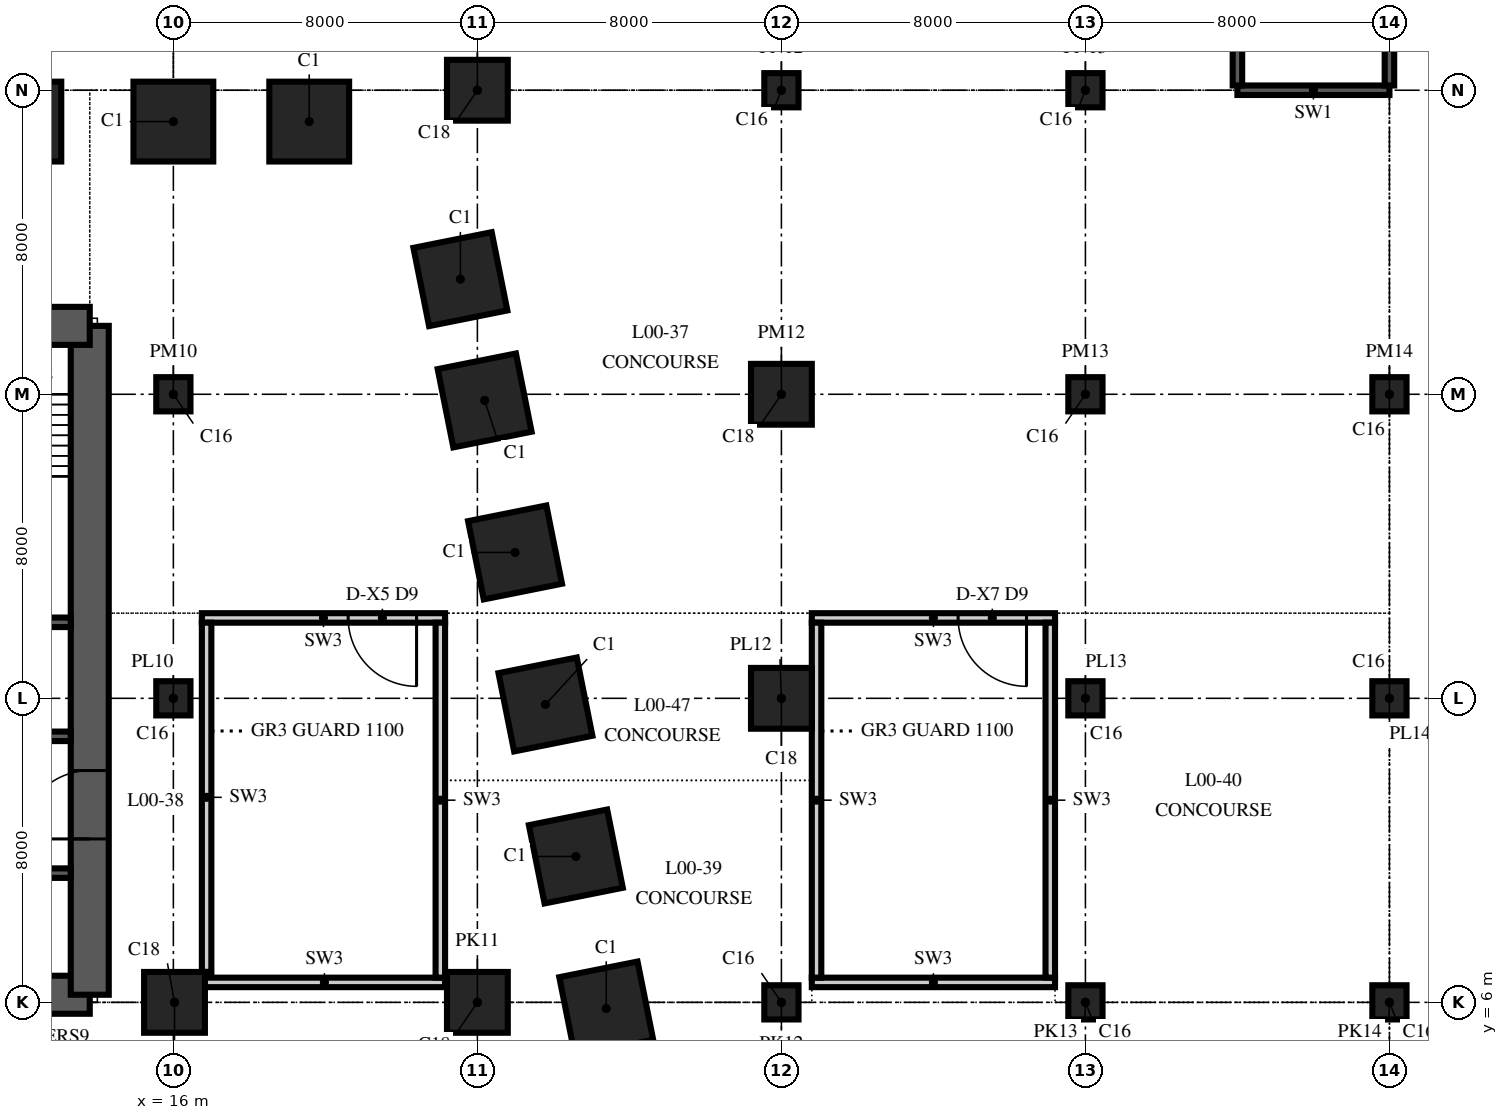
"""IFC4 building model, lengths in metres.
Left out: names, types, materials, properties, quantities, classifications, styles, units other than length and angle.
Written with IfcOpenShell. Run it as: python <this file> out.ifc"""

import sys

from ifc_helpers import new_model, si_unit, direction, frame, frame_2d, origin, origin_2d, place, context, subcontext, project, spatial, polyline, rectangle, outline, extrude, element, fill, save


model = new_model("IFC4")
c1 = context("Model", 3, precision=1e-05, world=origin(), true_north=direction((0.0, 1.0)))
c2 = subcontext(c1, "Body", "Model", "MODEL_VIEW")
j1 = project(units=[si_unit("LENGTHUNIT", "METRE"), si_unit("PLANEANGLEUNIT", "RADIAN")], contexts=[c1])
p1 = place(None, origin())
s1 = spatial("IfcSite", under=j1, at=p1, CompositionType="ELEMENT")
p2 = place(p1, origin())
s2 = spatial("IfcBuilding", under=s1, at=p2, CompositionType="ELEMENT")
p3 = place(p2, origin())
s3 = spatial("IfcBuildingStorey", under=s2, at=p3, CompositionType="ELEMENT", Elevation=0.0)
for number, where, z_axis, x_axis in (
    (1, (27.391, 5.838, 0.0), (0.0, 0.0, 1.0), (-0.196, 0.981, 0.0)),
    (2, (26.591, 9.838, 0.0), (0.0, 0.0, 1.0), (-0.196, 0.981, 0.0)),
    (3, (25.791, 13.838, 0.0), (0.0, 0.0, 1.0), (-0.196, 0.981, 0.0)),
    (4, (24.991, 17.838, 0.0), (0.0, 0.0, 1.0), (-0.196, 0.981, 0.0)),
    (5, (24.191, 21.838, 0.0), (0.0, 0.0, 1.0), (-0.196, 0.981, 0.0)),
    (6, (23.553, 25.029, 0.0), (0.0, 0.0, 1.0), (-0.196, 0.981, 0.0)),
    (7, (19.575, 29.175, 0.0), (0.0, 0.0, 1.0), (-1.0, 0.0, 0.0)),
    (8, (16.0, 29.175, 0.0), (0.0, 0.0, 1.0), (-1.0, 0.0, 0.0)),
    (9, (12.0, 29.175, 0.0), (0.0, 0.0, 1.0), (-1.0, 0.0, 0.0)),
):
    element("IfcColumn", number, at=place(p3, frame(where, z_axis=z_axis, x_axis=x_axis)), inside=s3, PredefinedType="COLUMN", context=c2, shape_type="SweptSolid", body=[
        extrude(rectangle(XDim=2.1, YDim=2.1, at=origin_2d()), origin(), (0.0, 0.0, 1.0), 6.0),
    ])
p4 = place(p3, frame((16.03, 6.0, 0.0), z_axis=(0.0, 0.0, 1.0), x_axis=(1.0, 0.0, 0.0)))
e10 = element("IfcColumn", 10, at=p4, inside=s3, PredefinedType="COLUMN", context=c2, shape_type="SweptSolid", body=[
    extrude(rectangle(XDim=1.6, YDim=1.6, at=origin_2d()), origin(), (0.0, 0.0, 1.0), 6.0),
])
for number, where, z_axis, x_axis in (
    (11, (16.0, 14.0, 0.0), (0.0, 0.0, 1.0), (1.0, 0.0, 0.0)),
    (12, (16.0, 22.0, 0.0), (0.0, 0.0, 1.0), (1.0, 0.0, 0.0)),
):
    element("IfcColumn", number, at=place(p3, frame(where, z_axis=z_axis, x_axis=x_axis)), inside=s3, PredefinedType="COLUMN", context=c2, shape_type="SweptSolid", body=[
        extrude(rectangle(XDim=0.9, YDim=0.9, at=origin_2d()), origin(), (0.0, 0.0, 1.0), 6.0),
    ])
for number, where, z_axis, x_axis in (
    (13, (24.0, 6.0, 0.0), (0.0, 0.0, 1.0), (1.0, 0.0, 0.0)),
    (14, (24.0, 30.0, 0.0), (0.0, 0.0, 1.0), (1.0, 0.0, 0.0)),
):
    element("IfcColumn", number, at=place(p3, frame(where, z_axis=z_axis, x_axis=x_axis)), inside=s3, PredefinedType="COLUMN", context=c2, shape_type="SweptSolid", body=[
        extrude(rectangle(XDim=1.6, YDim=1.6, at=origin_2d()), origin(), (0.0, 0.0, 1.0), 6.0),
    ])
p5 = place(p3, frame((32.0, 6.0, 0.0), z_axis=(0.0, 0.0, 1.0), x_axis=(1.0, 0.0, 0.0)))
e15 = element("IfcColumn", 15, at=p5, inside=s3, PredefinedType="COLUMN", context=c2, shape_type="SweptSolid", body=[
    extrude(rectangle(XDim=0.9, YDim=0.9, at=origin_2d()), origin(), (0.0, 0.0, 1.0), 6.0),
])
for number, where, z_axis, x_axis in (
    (16, (32.0, 14.0, 0.0), (0.0, 0.0, 1.0), (1.0, 0.0, 0.0)),
    (17, (32.0, 22.0, 0.0), (0.0, 0.0, 1.0), (1.0, 0.0, 0.0)),
):
    element("IfcColumn", number, at=place(p3, frame(where, z_axis=z_axis, x_axis=x_axis)), inside=s3, PredefinedType="COLUMN", context=c2, shape_type="SweptSolid", body=[
        extrude(rectangle(XDim=1.6, YDim=1.6, at=origin_2d()), origin(), (0.0, 0.0, 1.0), 6.0),
    ])
for number, where, z_axis, x_axis in (
    (18, (32.0, 30.0, 0.0), (0.0, 0.0, 1.0), (1.0, 0.0, 0.0)),
    (19, (40.0, 6.0, 0.0), (0.0, 0.0, 1.0), (1.0, 0.0, 0.0)),
    (20, (40.0, 14.0, 0.0), (0.0, 0.0, 1.0), (1.0, 0.0, 0.0)),
    (21, (40.0, 22.0, 0.0), (0.0, 0.0, 1.0), (1.0, 0.0, 0.0)),
    (22, (40.0, 30.0, 0.0), (0.0, 0.0, 1.0), (1.0, 0.0, 0.0)),
    (23, (48.0, 6.0, 0.0), (0.0, 0.0, 1.0), (1.0, 0.0, 0.0)),
    (24, (48.0, 14.0, 0.0), (0.0, 0.0, 1.0), (1.0, 0.0, 0.0)),
    (25, (48.0, 22.0, 0.0), (0.0, 0.0, 1.0), (1.0, 0.0, 0.0)),
):
    element("IfcColumn", number, at=place(p3, frame(where, z_axis=z_axis, x_axis=x_axis)), inside=s3, PredefinedType="COLUMN", context=c2, shape_type="SweptSolid", body=[
        extrude(rectangle(XDim=0.9, YDim=0.9, at=origin_2d()), origin(), (0.0, 0.0, 1.0), 6.0),
    ])
p6 = place(p3, frame((-13.8, 6.2, 0.0), z_axis=(0.0, 0.0, 1.0), x_axis=(1.0, 0.0, 0.0)))
e26 = element("IfcWall", 26, at=p6, inside=s3, PredefinedType="SHEAR", context=c2, shape_type="SweptSolid", body=[
    extrude(rectangle(XDim=27.6, YDim=1.0, at=frame_2d((13.8, 0.0))), origin(), (0.0, 0.0, 1.0), 6.0),
])
p7 = place(p3, frame((13.8, 6.2, 0.0), z_axis=(0.0, 0.0, 1.0), x_axis=(0.0, 1.0, 0.0)))
e27 = element("IfcWall", 27, at=p7, inside=s3, PredefinedType="SHEAR", context=c2, shape_type="SweptSolid", body=[
    extrude(outline(polyline([(0.0, -0.5), (17.6, -0.5), (17.6, 0.0), (17.1, 0.0), (17.1, 0.5), (0.5, 0.5), (0.5, 0.0), (0.0, 0.0), (0.0, -0.5)])), origin(), (0.0, 0.0, 1.0), 6.0),
])
p8 = place(p7, frame((4.1, 0.0, 0.0)))
e28 = element("IfcOpeningElement", 28, at=p8, cuts=e27, PredefinedType="OPENING", context=c2, shape_type="SweptSolid", body=[
    extrude(rectangle(XDim=1.8, YDim=2.4, at=frame_2d((0.9, 1.2))), frame((0.0, 0.515, 0.0), z_axis=(0.0, -1.0, 0.0), x_axis=(1.0, 0.0, 0.0)), (0.0, 0.0, 1.0), 1.03),
])
p9 = place(p3, frame((13.8, 23.8, 0.0), z_axis=(0.0, 0.0, 1.0), x_axis=(-1.0, 0.0, 0.0)))
e29 = element("IfcWall", 29, at=p9, inside=s3, PredefinedType="SHEAR", context=c2, shape_type="SweptSolid", body=[
    extrude(rectangle(XDim=27.6, YDim=1.0, at=frame_2d((13.8, 0.0))), origin(), (0.0, 0.0, 1.0), 6.0),
])
p10 = place(p9, frame((21.7, 0.0, 0.0)))
e30 = element("IfcOpeningElement", 30, at=p10, cuts=e29, PredefinedType="OPENING", context=c2, shape_type="SweptSolid", body=[
    extrude(rectangle(XDim=1.0, YDim=2.1, at=frame_2d((0.5, 1.05))), frame((0.0, 0.515, 0.0), z_axis=(0.0, -1.0, 0.0), x_axis=(1.0, 0.0, 0.0)), (0.0, 0.0, 1.0), 1.03),
])
p11 = place(p9, frame((4.9, 0.0, 0.0)))
e31 = element("IfcOpeningElement", 31, at=p11, cuts=e29, PredefinedType="OPENING", context=c2, shape_type="SweptSolid", body=[
    extrude(rectangle(XDim=1.0, YDim=2.1, at=frame_2d((0.5, 1.05))), frame((0.0, 0.515, 0.0), z_axis=(0.0, -1.0, 0.0), x_axis=(1.0, 0.0, 0.0)), (0.0, 0.0, 1.0), 1.03),
])
p12 = place(p9, frame((17.3, 0.0, 0.0)))
e32 = element("IfcOpeningElement", 32, at=p12, cuts=e29, PredefinedType="OPENING", context=c2, shape_type="SweptSolid", body=[
    extrude(rectangle(XDim=1.0, YDim=2.1, at=frame_2d((0.5, 1.05))), frame((0.0, 0.515, 0.0), z_axis=(0.0, -1.0, 0.0), x_axis=(1.0, 0.0, 0.0)), (0.0, 0.0, 1.0), 1.03),
])
p13 = place(p9, frame((13.3, 0.0, 0.0)))
e33 = element("IfcOpeningElement", 33, at=p13, cuts=e29, PredefinedType="OPENING", context=c2, shape_type="SweptSolid", body=[
    extrude(rectangle(XDim=1.0, YDim=2.1, at=frame_2d((0.5, 1.05))), frame((0.0, 0.515, 0.0), z_axis=(0.0, -1.0, 0.0), x_axis=(1.0, 0.0, 0.0)), (0.0, 0.0, 1.0), 1.03),
])
p14 = place(p9, frame((9.3, 0.0, 0.0)))
e34 = element("IfcOpeningElement", 34, at=p14, cuts=e29, PredefinedType="OPENING", context=c2, shape_type="SweptSolid", body=[
    extrude(rectangle(XDim=1.0, YDim=2.1, at=frame_2d((0.5, 1.05))), frame((0.0, 0.515, 0.0), z_axis=(0.0, -1.0, 0.0), x_axis=(1.0, 0.0, 0.0)), (0.0, 0.0, 1.0), 1.03),
])
p15 = place(p3, frame((-13.3, 9.4, 0.0), z_axis=(0.0, 0.0, 1.0), x_axis=(1.0, 0.0, 0.0)))
e35 = element("IfcWall", 35, at=p15, inside=s3, PredefinedType="SHEAR", context=c2, shape_type="SweptSolid", body=[
    extrude(rectangle(XDim=26.6, YDim=0.25, at=frame_2d((13.3, 0.0))), origin(), (0.0, 0.0, 1.0), 6.0),
])
p16 = place(p15, frame((0.15, 0.0, 0.0)))
e36 = element("IfcOpeningElement", 36, at=p16, cuts=e35, PredefinedType="OPENING", context=c2, shape_type="SweptSolid", body=[
    extrude(rectangle(XDim=1.1, YDim=2.1, at=frame_2d((0.55, 1.05))), frame((0.0, 0.14, 0.0), z_axis=(0.0, -1.0, 0.0), x_axis=(1.0, 0.0, 0.0)), (0.0, 0.0, 1.0), 0.28),
])
p17 = place(p15, frame((2.95, 0.0, 0.0)))
e37 = element("IfcOpeningElement", 37, at=p17, cuts=e35, PredefinedType="OPENING", context=c2, shape_type="SweptSolid", body=[
    extrude(rectangle(XDim=1.1, YDim=2.1, at=frame_2d((0.55, 1.05))), frame((0.0, 0.14, 0.0), z_axis=(0.0, -1.0, 0.0), x_axis=(1.0, 0.0, 0.0)), (0.0, 0.0, 1.0), 0.28),
])
p18 = place(p15, frame((5.75, 0.0, 0.0)))
e38 = element("IfcOpeningElement", 38, at=p18, cuts=e35, PredefinedType="OPENING", context=c2, shape_type="SweptSolid", body=[
    extrude(rectangle(XDim=1.1, YDim=2.1, at=frame_2d((0.55, 1.05))), frame((0.0, 0.14, 0.0), z_axis=(0.0, -1.0, 0.0), x_axis=(1.0, 0.0, 0.0)), (0.0, 0.0, 1.0), 0.28),
])
p19 = place(p15, frame((8.55, 0.0, 0.0)))
e39 = element("IfcOpeningElement", 39, at=p19, cuts=e35, PredefinedType="OPENING", context=c2, shape_type="SweptSolid", body=[
    extrude(rectangle(XDim=1.1, YDim=2.1, at=frame_2d((0.55, 1.05))), frame((0.0, 0.14, 0.0), z_axis=(0.0, -1.0, 0.0), x_axis=(1.0, 0.0, 0.0)), (0.0, 0.0, 1.0), 0.28),
])
p20 = place(p15, frame((11.35, 0.0, 0.0)))
e40 = element("IfcOpeningElement", 40, at=p20, cuts=e35, PredefinedType="OPENING", context=c2, shape_type="SweptSolid", body=[
    extrude(rectangle(XDim=1.1, YDim=2.1, at=frame_2d((0.55, 1.05))), frame((0.0, 0.14, 0.0), z_axis=(0.0, -1.0, 0.0), x_axis=(1.0, 0.0, 0.0)), (0.0, 0.0, 1.0), 0.28),
])
p21 = place(p15, frame((14.15, 0.0, 0.0)))
e41 = element("IfcOpeningElement", 41, at=p21, cuts=e35, PredefinedType="OPENING", context=c2, shape_type="SweptSolid", body=[
    extrude(rectangle(XDim=1.1, YDim=2.1, at=frame_2d((0.55, 1.05))), frame((0.0, 0.14, 0.0), z_axis=(0.0, -1.0, 0.0), x_axis=(1.0, 0.0, 0.0)), (0.0, 0.0, 1.0), 0.28),
])
p22 = place(p15, frame((16.95, 0.0, 0.0)))
e42 = element("IfcOpeningElement", 42, at=p22, cuts=e35, PredefinedType="OPENING", context=c2, shape_type="SweptSolid", body=[
    extrude(rectangle(XDim=1.1, YDim=2.1, at=frame_2d((0.55, 1.05))), frame((0.0, 0.14, 0.0), z_axis=(0.0, -1.0, 0.0), x_axis=(1.0, 0.0, 0.0)), (0.0, 0.0, 1.0), 0.28),
])
p23 = place(p15, frame((19.75, 0.0, 0.0)))
e43 = element("IfcOpeningElement", 43, at=p23, cuts=e35, PredefinedType="OPENING", context=c2, shape_type="SweptSolid", body=[
    extrude(rectangle(XDim=1.1, YDim=2.1, at=frame_2d((0.55, 1.05))), frame((0.0, 0.14, 0.0), z_axis=(0.0, -1.0, 0.0), x_axis=(1.0, 0.0, 0.0)), (0.0, 0.0, 1.0), 0.28),
])
p24 = place(p15, frame((22.55, 0.0, 0.0)))
e44 = element("IfcOpeningElement", 44, at=p24, cuts=e35, PredefinedType="OPENING", context=c2, shape_type="SweptSolid", body=[
    extrude(rectangle(XDim=1.1, YDim=2.1, at=frame_2d((0.55, 1.05))), frame((0.0, 0.14, 0.0), z_axis=(0.0, -1.0, 0.0), x_axis=(1.0, 0.0, 0.0)), (0.0, 0.0, 1.0), 0.28),
])
p25 = place(p3, frame((-13.3, 13.0, 0.0), z_axis=(0.0, 0.0, 1.0), x_axis=(1.0, 0.0, 0.0)))
e45 = element("IfcWall", 45, at=p25, inside=s3, PredefinedType="SHEAR", context=c2, shape_type="SweptSolid", body=[
    extrude(rectangle(XDim=26.6, YDim=0.25, at=frame_2d((13.3, 0.0))), origin(), (0.0, 0.0, 1.0), 6.0),
])
p26 = place(p25, frame((0.15, 0.0, 0.0)))
e46 = element("IfcOpeningElement", 46, at=p26, cuts=e45, PredefinedType="OPENING", context=c2, shape_type="SweptSolid", body=[
    extrude(rectangle(XDim=1.1, YDim=2.1, at=frame_2d((0.55, 1.05))), frame((0.0, 0.14, 0.0), z_axis=(0.0, -1.0, 0.0), x_axis=(1.0, 0.0, 0.0)), (0.0, 0.0, 1.0), 0.28),
])
p27 = place(p25, frame((8.55, 0.0, 0.0)))
e47 = element("IfcOpeningElement", 47, at=p27, cuts=e45, PredefinedType="OPENING", context=c2, shape_type="SweptSolid", body=[
    extrude(rectangle(XDim=1.1, YDim=2.1, at=frame_2d((0.55, 1.05))), frame((0.0, 0.14, 0.0), z_axis=(0.0, -1.0, 0.0), x_axis=(1.0, 0.0, 0.0)), (0.0, 0.0, 1.0), 0.28),
])
p28 = place(p25, frame((11.95, 0.0, 0.0)))
e48 = element("IfcOpeningElement", 48, at=p28, cuts=e45, PredefinedType="OPENING", context=c2, shape_type="SweptSolid", body=[
    extrude(rectangle(XDim=1.1, YDim=2.1, at=frame_2d((0.55, 1.05))), frame((0.0, 0.14, 0.0), z_axis=(0.0, -1.0, 0.0), x_axis=(1.0, 0.0, 0.0)), (0.0, 0.0, 1.0), 0.28),
])
p29 = place(p25, frame((15.05, 0.0, 0.0)))
e49 = element("IfcOpeningElement", 49, at=p29, cuts=e45, PredefinedType="OPENING", context=c2, shape_type="SweptSolid", body=[
    extrude(rectangle(XDim=0.9, YDim=2.1, at=frame_2d((0.45, 1.05))), frame((0.0, 0.14, 0.0), z_axis=(0.0, -1.0, 0.0), x_axis=(1.0, 0.0, 0.0)), (0.0, 0.0, 1.0), 0.28),
])
p30 = place(p25, frame((17.45, 0.0, 0.0)))
e50 = element("IfcOpeningElement", 50, at=p30, cuts=e45, PredefinedType="OPENING", context=c2, shape_type="SweptSolid", body=[
    extrude(rectangle(XDim=0.9, YDim=2.1, at=frame_2d((0.45, 1.05))), frame((0.0, 0.14, 0.0), z_axis=(0.0, -1.0, 0.0), x_axis=(1.0, 0.0, 0.0)), (0.0, 0.0, 1.0), 0.28),
])
p31 = place(p25, frame((20.85, 0.0, 0.0)))
e51 = element("IfcOpeningElement", 51, at=p31, cuts=e45, PredefinedType="OPENING", context=c2, shape_type="SweptSolid", body=[
    extrude(rectangle(XDim=0.9, YDim=2.1, at=frame_2d((0.45, 1.05))), frame((0.0, 0.14, 0.0), z_axis=(0.0, -1.0, 0.0), x_axis=(1.0, 0.0, 0.0)), (0.0, 0.0, 1.0), 0.28),
])
p32 = place(p3, frame((-13.3, 16.0, 0.0), z_axis=(0.0, 0.0, 1.0), x_axis=(1.0, 0.0, 0.0)))
e52 = element("IfcWall", 52, at=p32, inside=s3, PredefinedType="SHEAR", context=c2, shape_type="SweptSolid", body=[
    extrude(rectangle(XDim=26.6, YDim=0.25, at=frame_2d((13.3, 0.0))), origin(), (0.0, 0.0, 1.0), 6.0),
])
p33 = place(p3, frame((44.0, 30.0, 0.0), z_axis=(0.0, 0.0, 1.0), x_axis=(1.0, 0.0, 0.0)))
e53 = element("IfcWall", 53, at=p33, inside=s3, PredefinedType="SOLIDWALL", context=c2, shape_type="SweptSolid", body=[
    extrude(rectangle(XDim=4.0, YDim=0.25, at=frame_2d((2.0, 0.0))), origin(), (0.0, 0.0, 1.0), 6.0),
])
p34 = place(p3, frame((48.0, 30.125, 0.0), z_axis=(0.0, 0.0, 1.0), x_axis=(0.0, 1.0, 0.0)))
e54 = element("IfcWall", 54, at=p34, inside=s3, PredefinedType="SOLIDWALL", context=c2, shape_type="SweptSolid", body=[
    extrude(rectangle(XDim=7.75, YDim=0.25, at=frame_2d((3.875, 0.0))), origin(), (0.0, 0.0, 1.0), 6.0),
])
p35 = place(p34, frame((5.85, 0.0, 0.0)))
e55 = element("IfcOpeningElement", 55, at=p35, cuts=e54, PredefinedType="OPENING", context=c2, shape_type="SweptSolid", body=[
    extrude(rectangle(XDim=1.6, YDim=2.1, at=frame_2d((0.8, 1.05))), frame((0.0, 0.14, 0.0), z_axis=(0.0, -1.0, 0.0), x_axis=(1.0, 0.0, 0.0)), (0.0, 0.0, 1.0), 0.28),
])
p36 = place(p3, frame((44.0, 37.875, 0.0), z_axis=(0.0, 0.0, 1.0), x_axis=(0.0, -1.0, 0.0)))
e56 = element("IfcWall", 56, at=p36, inside=s3, PredefinedType="SOLIDWALL", context=c2, shape_type="SweptSolid", body=[
    extrude(rectangle(XDim=7.75, YDim=0.25, at=frame_2d((3.875, 0.0))), origin(), (0.0, 0.0, 1.0), 6.0),
])
p37 = place(p3, frame((16.8, 6.525, 0.0), z_axis=(0.0, 0.0, 1.0), x_axis=(1.0, 0.0, 0.0)))
e57 = element("IfcWall", 57, at=p37, inside=s3, PredefinedType="SOLIDWALL", context=c2, shape_type="SweptSolid", body=[
    extrude(rectangle(XDim=6.35, YDim=0.25, at=frame_2d((3.175, 0.0))), origin(), (0.0, 0.0, 1.0), 5.05),
])
p38 = place(p3, frame((23.15, 16.115, 0.0), z_axis=(0.0, 0.0, 1.0), x_axis=(-1.0, 0.0, 0.0)))
e58 = element("IfcWall", 58, at=p38, inside=s3, PredefinedType="SOLIDWALL", context=c2, shape_type="SweptSolid", body=[
    extrude(rectangle(XDim=6.4, YDim=0.25, at=frame_2d((3.2, 0.0))), origin(), (0.0, 0.0, 1.0), 6.0),
])
p39 = place(p38, frame((0.75, 0.0, 0.0)))
e59 = element("IfcOpeningElement", 59, at=p39, cuts=e58, PredefinedType="OPENING", context=c2, shape_type="SweptSolid", body=[
    extrude(rectangle(XDim=1.8, YDim=2.1, at=frame_2d((0.9, 1.05))), frame((0.0, 0.14, 0.0), z_axis=(0.0, -1.0, 0.0), x_axis=(1.0, 0.0, 0.0)), (0.0, 0.0, 1.0), 0.28),
])
p40 = place(p3, frame((16.875, 15.99, 0.0), z_axis=(0.0, 0.0, 1.0), x_axis=(0.0, -1.0, 0.0)))
e60 = element("IfcWall", 60, at=p40, inside=s3, PredefinedType="SOLIDWALL", context=c2, shape_type="SweptSolid", body=[
    extrude(rectangle(XDim=9.19, YDim=0.25, at=frame_2d((4.595, 0.0))), origin(), (0.0, 0.0, 1.0), 6.0),
])
p41 = place(p3, frame((23.025, 6.65, 0.0), z_axis=(0.0, 0.0, 1.0), x_axis=(0.0, 1.0, 0.0)))
e61 = element("IfcWall", 61, at=p41, inside=s3, PredefinedType="SOLIDWALL", context=c2, shape_type="SweptSolid", body=[
    extrude(rectangle(XDim=9.34, YDim=0.25, at=frame_2d((4.67, 0.0))), origin(), (0.0, 0.0, 1.0), 6.0),
])
p42 = place(p3, frame((32.8, 6.525, 0.0), z_axis=(0.0, 0.0, 1.0), x_axis=(1.0, 0.0, 0.0)))
e62 = element("IfcWall", 62, at=p42, inside=s3, PredefinedType="SOLIDWALL", context=c2, shape_type="SweptSolid", body=[
    extrude(rectangle(XDim=6.4, YDim=0.25, at=frame_2d((3.2, 0.0))), origin(), (0.0, 0.0, 1.0), 5.05),
])
p43 = place(p3, frame((39.2, 16.115, 0.0), z_axis=(0.0, 0.0, 1.0), x_axis=(-1.0, 0.0, 0.0)))
e63 = element("IfcWall", 63, at=p43, inside=s3, PredefinedType="SOLIDWALL", context=c2, shape_type="SweptSolid", body=[
    extrude(rectangle(XDim=6.4, YDim=0.25, at=frame_2d((3.2, 0.0))), origin(), (0.0, 0.0, 1.0), 6.0),
])
p44 = place(p43, frame((0.75, 0.0, 0.0)))
e64 = element("IfcOpeningElement", 64, at=p44, cuts=e63, PredefinedType="OPENING", context=c2, shape_type="SweptSolid", body=[
    extrude(rectangle(XDim=1.8, YDim=2.1, at=frame_2d((0.9, 1.05))), frame((0.0, 0.14, 0.0), z_axis=(0.0, -1.0, 0.0), x_axis=(1.0, 0.0, 0.0)), (0.0, 0.0, 1.0), 0.28),
])
for number, where, z_axis, x_axis in (
    (65, (32.925, 15.99, 0.0), (0.0, 0.0, 1.0), (0.0, -1.0, 0.0)),
    (66, (39.075, 6.65, 0.0), (0.0, 0.0, 1.0), (0.0, 1.0, 0.0)),
):
    element("IfcWall", number, at=place(p3, frame(where, z_axis=z_axis, x_axis=x_axis)), inside=s3, PredefinedType="SOLIDWALL", context=c2, shape_type="SweptSolid", body=[
        extrude(rectangle(XDim=9.34, YDim=0.25, at=frame_2d((4.67, 0.0))), origin(), (0.0, 0.0, 1.0), 6.0),
    ])
p45 = place(p8, origin())
e67 = element("IfcDoor", 67, at=p45, inside=s3, OperationType="DOUBLE_DOOR_SINGLE_SWING", PredefinedType="DOOR", context=c2, shape_type="SweptSolid", body=[
    extrude(rectangle(XDim=1.8, YDim=2.4, at=frame_2d((0.9, 1.2))), frame((0.0, 0.5, 0.0), z_axis=(0.0, -1.0, 0.0), x_axis=(1.0, 0.0, 0.0)), (0.0, 0.0, 1.0), 1.0),
])
fill(e28, e67)
p46 = place(p39, origin())
e68 = element("IfcDoor", 68, at=p46, inside=s3, OperationType="DOUBLE_DOOR_SINGLE_SWING", PredefinedType="DOOR", context=c2, shape_type="SweptSolid", body=[
    extrude(rectangle(XDim=1.8, YDim=2.1, at=frame_2d((0.9, 1.05))), frame((0.0, 0.125, 0.0), z_axis=(0.0, -1.0, 0.0), x_axis=(1.0, 0.0, 0.0)), (0.0, 0.0, 1.0), 0.25),
])
fill(e59, e68)
p47 = place(p44, origin())
e69 = element("IfcDoor", 69, at=p47, inside=s3, OperationType="DOUBLE_DOOR_SINGLE_SWING", PredefinedType="DOOR", context=c2, shape_type="SweptSolid", body=[
    extrude(rectangle(XDim=1.8, YDim=2.1, at=frame_2d((0.9, 1.05))), frame((0.0, 0.125, 0.0), z_axis=(0.0, -1.0, 0.0), x_axis=(1.0, 0.0, 0.0)), (0.0, 0.0, 1.0), 0.25),
])
fill(e64, e69)
save(model, sys.argv[1])
